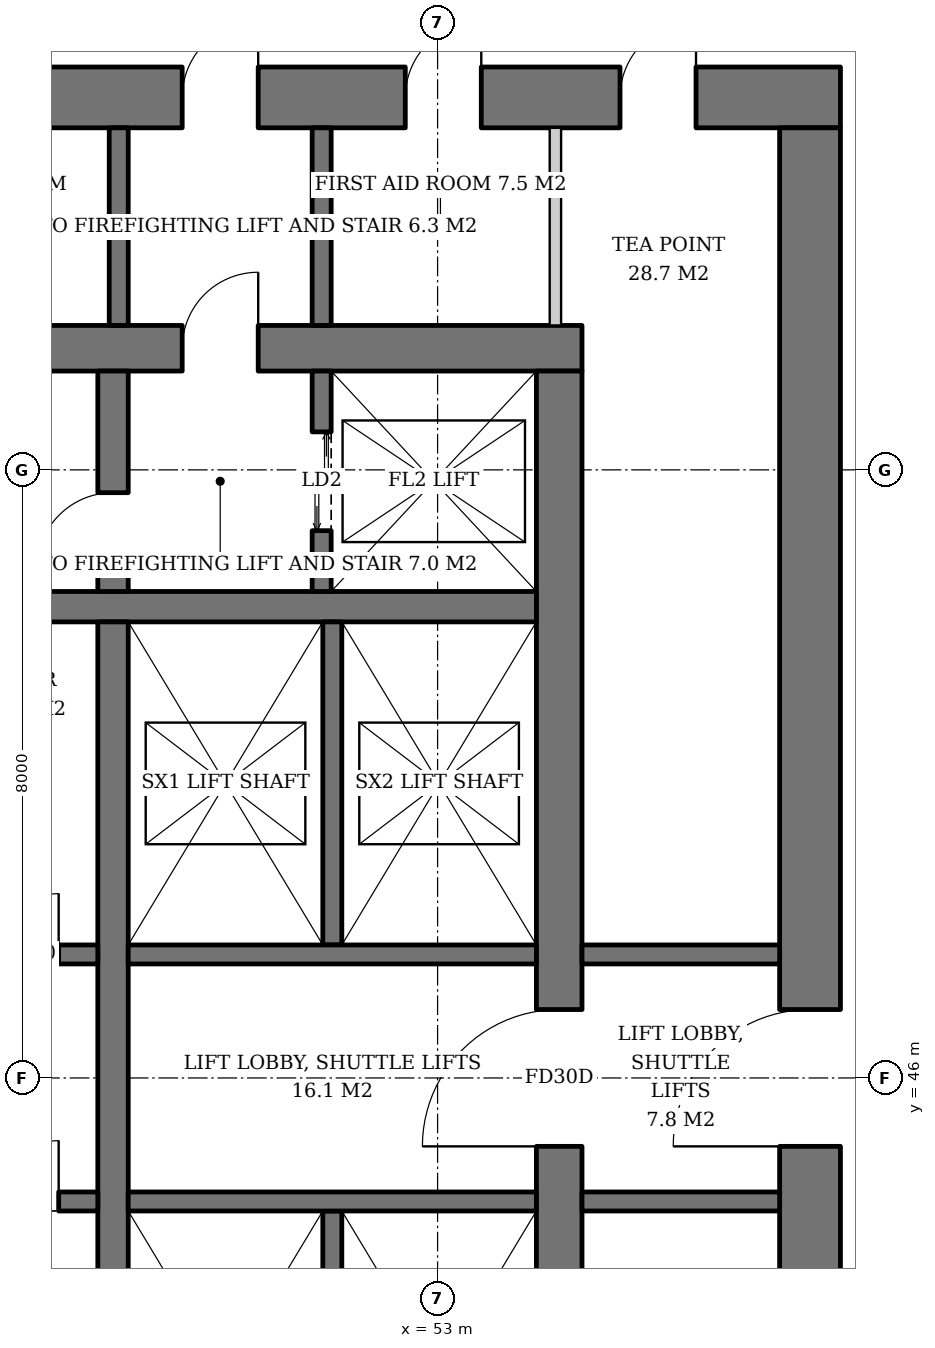
"""IFC4 building model, lengths in metres.
Left out: names, types, materials, properties, quantities, classifications, styles, units other than length and angle.
Written with IfcOpenShell. Run it as: python <this file> out.ifc"""

import sys

from ifc_helpers import new_model, si_unit, direction, frame, frame_2d, origin, place, context, subcontext, project, spatial, rectangle, extrude, element, fill, save


model = new_model("IFC4")
c1 = context("Model", 3, precision=1e-05, world=origin(), true_north=direction((0.0, 1.0)))
c2 = subcontext(c1, "Body", "Model", "MODEL_VIEW")
j1 = project(units=[si_unit("LENGTHUNIT", "METRE"), si_unit("PLANEANGLEUNIT", "RADIAN")], contexts=[c1])
p1 = place(None, origin())
s1 = spatial("IfcSite", under=j1, at=p1, CompositionType="ELEMENT")
p2 = place(p1, origin())
s2 = spatial("IfcBuilding", under=s1, at=p2, CompositionType="ELEMENT")
p3 = place(p2, frame((0.0, 0.0, 74.2)))
s3 = spatial("IfcBuildingStorey", under=s2, at=p3, CompositionType="ELEMENT", Elevation=74.2)
p4 = place(p3, frame((35.1, 55.6, 0.0), z_axis=(0.0, 0.0, 1.0), x_axis=(1.0, 0.0, 0.0)))
e1 = element("IfcWall", 1, at=p4, inside=s3, PredefinedType="SHEAR", context=c2, shape_type="SweptSolid", body=[
    extrude(rectangle(XDim=19.8, YDim=0.6, at=frame_2d((9.9, 0.0))), origin(), (0.0, 0.0, 1.0), 3.8),
])
p5 = place(p4, frame((14.54, 0.0, 0.0)))
e2 = element("IfcOpeningElement", 2, at=p5, cuts=e1, PredefinedType="OPENING", context=c2, shape_type="SweptSolid", body=[
    extrude(rectangle(XDim=1.0, YDim=2.1, at=frame_2d((0.5, 1.05))), frame((0.0, 0.31, 0.0), z_axis=(0.0, -1.0, 0.0), x_axis=(1.0, 0.0, 0.0)), (0.0, 0.0, 1.0), 0.62),
])
p6 = place(p4, frame((2.425, 0.0, 0.0)))
e3 = element("IfcOpeningElement", 3, at=p6, cuts=e1, PredefinedType="OPENING", context=c2, shape_type="SweptSolid", body=[
    extrude(rectangle(XDim=1.0, YDim=2.1, at=frame_2d((0.5, 1.05))), frame((0.0, 0.31, 0.0), z_axis=(0.0, -1.0, 0.0), x_axis=(1.0, 0.0, 0.0)), (0.0, 0.0, 1.0), 0.62),
])
p7 = place(p3, frame((54.6, 36.7, 0.0), z_axis=(0.0, 0.0, 1.0), x_axis=(0.0, 1.0, 0.0)))
e4 = element("IfcWall", 4, at=p7, inside=s3, PredefinedType="SHEAR", context=c2, shape_type="SweptSolid", body=[
    extrude(rectangle(XDim=18.6, YDim=0.6, at=frame_2d((9.3, 0.0))), origin(), (0.0, 0.0, 1.0), 3.8),
])
p8 = place(p7, frame((8.4, 0.0, 0.0)))
e5 = element("IfcOpeningElement", 5, at=p8, cuts=e4, PredefinedType="OPENING", context=c2, shape_type="SweptSolid", body=[
    extrude(rectangle(XDim=1.8, YDim=2.4, at=frame_2d((0.9, 1.2))), frame((0.0, 0.31, 0.0), z_axis=(0.0, -1.0, 0.0), x_axis=(1.0, 0.0, 0.0)), (0.0, 0.0, 1.0), 0.62),
])
p9 = place(p3, frame((31.7, 58.9, 0.0), z_axis=(0.0, 0.0, 1.0), x_axis=(1.0, 0.0, 0.0)))
e6 = element("IfcWall", 6, at=p9, inside=s3, PredefinedType="SHEAR", context=c2, shape_type="SweptSolid", body=[
    extrude(rectangle(XDim=26.6, YDim=0.8, at=frame_2d((13.3, 0.0))), origin(), (0.0, 0.0, 1.0), 3.8),
])
p10 = place(p9, frame((17.94, 0.0, 0.0)))
e7 = element("IfcOpeningElement", 7, at=p10, cuts=e6, PredefinedType="OPENING", context=c2, shape_type="SweptSolid", body=[
    extrude(rectangle(XDim=1.0, YDim=2.1, at=frame_2d((0.5, 1.05))), frame((0.0, 0.41, 0.0), z_axis=(0.0, -1.0, 0.0), x_axis=(1.0, 0.0, 0.0)), (0.0, 0.0, 1.0), 0.82),
])
p11 = place(p9, frame((5.825, 0.0, 0.0)))
e8 = element("IfcOpeningElement", 8, at=p11, cuts=e6, PredefinedType="OPENING", context=c2, shape_type="SweptSolid", body=[
    extrude(rectangle(XDim=1.0, YDim=2.1, at=frame_2d((0.5, 1.05))), frame((0.0, 0.41, 0.0), z_axis=(0.0, -1.0, 0.0), x_axis=(1.0, 0.0, 0.0)), (0.0, 0.0, 1.0), 0.82),
])
p12 = place(p9, frame((1.9, 0.0, 0.0)))
e9 = element("IfcOpeningElement", 9, at=p12, cuts=e6, PredefinedType="OPENING", context=c2, shape_type="SweptSolid", body=[
    extrude(rectangle(XDim=1.0, YDim=2.1, at=frame_2d((0.5, 1.05))), frame((0.0, 0.41, 0.0), z_axis=(0.0, -1.0, 0.0), x_axis=(1.0, 0.0, 0.0)), (0.0, 0.0, 1.0), 0.82),
])
p13 = place(p9, frame((4.134, 0.0, 0.0)))
e10 = element("IfcOpeningElement", 10, at=p13, cuts=e6, PredefinedType="OPENING", context=c2, shape_type="SweptSolid", body=[
    extrude(rectangle(XDim=1.0, YDim=2.1, at=frame_2d((0.5, 1.05))), frame((0.0, 0.41, 0.0), z_axis=(0.0, -1.0, 0.0), x_axis=(1.0, 0.0, 0.0)), (0.0, 0.0, 1.0), 0.82),
])
p14 = place(p9, frame((7.95, 0.0, 0.0)))
e11 = element("IfcOpeningElement", 11, at=p14, cuts=e6, PredefinedType="OPENING", context=c2, shape_type="SweptSolid", body=[
    extrude(rectangle(XDim=1.0, YDim=2.1, at=frame_2d((0.5, 1.05))), frame((0.0, 0.41, 0.0), z_axis=(0.0, -1.0, 0.0), x_axis=(1.0, 0.0, 0.0)), (0.0, 0.0, 1.0), 0.82),
])
p15 = place(p9, frame((11.038, 0.0, 0.0)))
e12 = element("IfcOpeningElement", 12, at=p15, cuts=e6, PredefinedType="OPENING", context=c2, shape_type="SweptSolid", body=[
    extrude(rectangle(XDim=1.0, YDim=2.1, at=frame_2d((0.5, 1.05))), frame((0.0, 0.41, 0.0), z_axis=(0.0, -1.0, 0.0), x_axis=(1.0, 0.0, 0.0)), (0.0, 0.0, 1.0), 0.82),
])
p16 = place(p9, frame((14.666, 0.0, 0.0)))
e13 = element("IfcOpeningElement", 13, at=p16, cuts=e6, PredefinedType="OPENING", context=c2, shape_type="SweptSolid", body=[
    extrude(rectangle(XDim=1.0, YDim=2.1, at=frame_2d((0.5, 1.05))), frame((0.0, 0.41, 0.0), z_axis=(0.0, -1.0, 0.0), x_axis=(1.0, 0.0, 0.0)), (0.0, 0.0, 1.0), 0.82),
])
p17 = place(p9, frame((20.875, 0.0, 0.0)))
e14 = element("IfcOpeningElement", 14, at=p17, cuts=e6, PredefinedType="OPENING", context=c2, shape_type="SweptSolid", body=[
    extrude(rectangle(XDim=1.0, YDim=2.1, at=frame_2d((0.5, 1.05))), frame((0.0, 0.41, 0.0), z_axis=(0.0, -1.0, 0.0), x_axis=(1.0, 0.0, 0.0)), (0.0, 0.0, 1.0), 0.82),
])
p18 = place(p9, frame((23.7, 0.0, 0.0)))
e15 = element("IfcOpeningElement", 15, at=p18, cuts=e6, PredefinedType="OPENING", context=c2, shape_type="SweptSolid", body=[
    extrude(rectangle(XDim=1.0, YDim=2.1, at=frame_2d((0.5, 1.05))), frame((0.0, 0.41, 0.0), z_axis=(0.0, -1.0, 0.0), x_axis=(1.0, 0.0, 0.0)), (0.0, 0.0, 1.0), 0.82),
])
p19 = place(p3, frame((57.9, 33.5, 0.0), z_axis=(0.0, 0.0, 1.0), x_axis=(0.0, 1.0, 0.0)))
e16 = element("IfcWall", 16, at=p19, inside=s3, PredefinedType="SHEAR", context=c2, shape_type="SweptSolid", body=[
    extrude(rectangle(XDim=25.0, YDim=0.8, at=frame_2d((12.5, 0.0))), origin(), (0.0, 0.0, 1.0), 3.8),
])
p20 = place(p19, frame((11.6, 0.0, 0.0)))
e17 = element("IfcOpeningElement", 17, at=p20, cuts=e16, PredefinedType="OPENING", context=c2, shape_type="SweptSolid", body=[
    extrude(rectangle(XDim=1.8, YDim=2.4, at=frame_2d((0.9, 1.2))), frame((0.0, 0.41, 0.0), z_axis=(0.0, -1.0, 0.0), x_axis=(1.0, 0.0, 0.0)), (0.0, 0.0, 1.0), 0.82),
])
p21 = place(p3, frame((35.7, 52.2, 0.0), z_axis=(0.0, 0.0, 1.0), x_axis=(1.0, 0.0, 0.0)))
e18 = element("IfcWall", 18, at=p21, inside=s3, PredefinedType="SHEAR", context=c2, shape_type="SweptSolid", body=[
    extrude(rectangle(XDim=18.6, YDim=0.4, at=frame_2d((9.3, 0.0))), origin(), (0.0, 0.0, 1.0), 3.8),
])
p22 = place(p3, frame((48.73, 40.0, 0.0), z_axis=(0.0, 0.0, 1.0), x_axis=(0.0, 1.0, 0.0)))
e19 = element("IfcWall", 19, at=p22, inside=s3, PredefinedType="SHEAR", context=c2, shape_type="SweptSolid", body=[
    extrude(rectangle(XDim=12.0, YDim=0.4, at=frame_2d((6.0, 0.0))), origin(), (0.0, 0.0, 1.0), 3.8),
])
p23 = place(p3, frame((48.73, 52.4, 0.0), z_axis=(0.0, 0.0, 1.0), x_axis=(0.0, 1.0, 0.0)))
e20 = element("IfcWall", 20, at=p23, inside=s3, PredefinedType="SHEAR", context=c2, shape_type="SweptSolid", body=[
    extrude(rectangle(XDim=2.9, YDim=0.4, at=frame_2d((1.45, 0.0))), origin(), (0.0, 0.0, 1.0), 3.8),
])
p24 = place(p23, frame((0.3, 0.0, 0.0)))
e21 = element("IfcOpeningElement", 21, at=p24, cuts=e20, PredefinedType="OPENING", context=c2, shape_type="SweptSolid", body=[
    extrude(rectangle(XDim=1.0, YDim=2.1, at=frame_2d((0.5, 1.05))), frame((0.0, 0.21, 0.0), z_axis=(0.0, -1.0, 0.0), x_axis=(1.0, 0.0, 0.0)), (0.0, 0.0, 1.0), 0.42),
])
p25 = place(p3, frame((51.475, 52.4, 0.0), z_axis=(0.0, 0.0, 1.0), x_axis=(0.0, 1.0, 0.0)))
e22 = element("IfcWall", 22, at=p25, inside=s3, PredefinedType="SHEAR", context=c2, shape_type="SweptSolid", body=[
    extrude(rectangle(XDim=2.9, YDim=0.25, at=frame_2d((1.45, 0.0))), origin(), (0.0, 0.0, 1.0), 3.8),
])
p26 = place(p25, frame((0.8, 0.0, 0.0)))
e23 = element("IfcOpeningElement", 23, at=p26, cuts=e22, PredefinedType="OPENING", context=c2, shape_type="SweptSolid", body=[
    extrude(rectangle(XDim=1.3, YDim=2.2, at=frame_2d((0.65, 1.1))), frame((0.0, 0.135, 0.0), z_axis=(0.0, -1.0, 0.0), x_axis=(1.0, 0.0, 0.0)), (0.0, 0.0, 1.0), 0.27),
])
p27 = place(p3, frame((35.7, 47.625, 0.0), z_axis=(0.0, 0.0, 1.0), x_axis=(1.0, 0.0, 0.0)))
e24 = element("IfcWall", 24, at=p27, inside=s3, PredefinedType="SHEAR", context=c2, shape_type="SweptSolid", body=[
    extrude(rectangle(XDim=12.83, YDim=0.25, at=frame_2d((6.415, 0.0))), origin(), (0.0, 0.0, 1.0), 3.8),
])
p28 = place(p27, frame((0.7, 0.0, 0.0)))
e25 = element("IfcOpeningElement", 25, at=p28, cuts=e24, PredefinedType="OPENING", context=c2, shape_type="SweptSolid", body=[
    extrude(rectangle(XDim=1.1, YDim=2.2, at=frame_2d((0.55, 1.1))), frame((0.0, 0.135, 0.0), z_axis=(0.0, -1.0, 0.0), x_axis=(1.0, 0.0, 0.0)), (0.0, 0.0, 1.0), 0.27),
])
p29 = place(p27, frame((3.45, 0.0, 0.0)))
e26 = element("IfcOpeningElement", 26, at=p29, cuts=e24, PredefinedType="OPENING", context=c2, shape_type="SweptSolid", body=[
    extrude(rectangle(XDim=1.1, YDim=2.2, at=frame_2d((0.55, 1.1))), frame((0.0, 0.135, 0.0), z_axis=(0.0, -1.0, 0.0), x_axis=(1.0, 0.0, 0.0)), (0.0, 0.0, 1.0), 0.27),
])
p30 = place(p27, frame((6.2, 0.0, 0.0)))
e27 = element("IfcOpeningElement", 27, at=p30, cuts=e24, PredefinedType="OPENING", context=c2, shape_type="SweptSolid", body=[
    extrude(rectangle(XDim=1.1, YDim=2.2, at=frame_2d((0.55, 1.1))), frame((0.0, 0.135, 0.0), z_axis=(0.0, -1.0, 0.0), x_axis=(1.0, 0.0, 0.0)), (0.0, 0.0, 1.0), 0.27),
])
p31 = place(p27, frame((8.95, 0.0, 0.0)))
e28 = element("IfcOpeningElement", 28, at=p31, cuts=e24, PredefinedType="OPENING", context=c2, shape_type="SweptSolid", body=[
    extrude(rectangle(XDim=1.1, YDim=2.2, at=frame_2d((0.55, 1.1))), frame((0.0, 0.135, 0.0), z_axis=(0.0, -1.0, 0.0), x_axis=(1.0, 0.0, 0.0)), (0.0, 0.0, 1.0), 0.27),
])
p32 = place(p27, frame((11.515, 0.0, 0.0)))
e29 = element("IfcOpeningElement", 29, at=p32, cuts=e24, PredefinedType="OPENING", context=c2, shape_type="SweptSolid", body=[
    extrude(rectangle(XDim=0.8, YDim=2.0, at=frame_2d((0.4, 1.0))), frame((0.0, 0.135, 0.0), z_axis=(0.0, -1.0, 0.0), x_axis=(1.0, 0.0, 0.0)), (0.0, 0.0, 1.0), 0.27),
])
p33 = place(p3, frame((35.7, 44.375, 0.0), z_axis=(0.0, 0.0, 1.0), x_axis=(1.0, 0.0, 0.0)))
e30 = element("IfcWall", 30, at=p33, inside=s3, PredefinedType="SHEAR", context=c2, shape_type="SweptSolid", body=[
    extrude(rectangle(XDim=12.83, YDim=0.25, at=frame_2d((6.415, 0.0))), origin(), (0.0, 0.0, 1.0), 3.8),
])
p34 = place(p33, frame((0.7, 0.0, 0.0)))
e31 = element("IfcOpeningElement", 31, at=p34, cuts=e30, PredefinedType="OPENING", context=c2, shape_type="SweptSolid", body=[
    extrude(rectangle(XDim=1.1, YDim=2.2, at=frame_2d((0.55, 1.1))), frame((0.0, 0.135, 0.0), z_axis=(0.0, -1.0, 0.0), x_axis=(1.0, 0.0, 0.0)), (0.0, 0.0, 1.0), 0.27),
])
p35 = place(p33, frame((3.45, 0.0, 0.0)))
e32 = element("IfcOpeningElement", 32, at=p35, cuts=e30, PredefinedType="OPENING", context=c2, shape_type="SweptSolid", body=[
    extrude(rectangle(XDim=1.1, YDim=2.2, at=frame_2d((0.55, 1.1))), frame((0.0, 0.135, 0.0), z_axis=(0.0, -1.0, 0.0), x_axis=(1.0, 0.0, 0.0)), (0.0, 0.0, 1.0), 0.27),
])
p36 = place(p33, frame((6.2, 0.0, 0.0)))
e33 = element("IfcOpeningElement", 33, at=p36, cuts=e30, PredefinedType="OPENING", context=c2, shape_type="SweptSolid", body=[
    extrude(rectangle(XDim=1.1, YDim=2.2, at=frame_2d((0.55, 1.1))), frame((0.0, 0.135, 0.0), z_axis=(0.0, -1.0, 0.0), x_axis=(1.0, 0.0, 0.0)), (0.0, 0.0, 1.0), 0.27),
])
p37 = place(p33, frame((8.95, 0.0, 0.0)))
e34 = element("IfcOpeningElement", 34, at=p37, cuts=e30, PredefinedType="OPENING", context=c2, shape_type="SweptSolid", body=[
    extrude(rectangle(XDim=1.1, YDim=2.2, at=frame_2d((0.55, 1.1))), frame((0.0, 0.135, 0.0), z_axis=(0.0, -1.0, 0.0), x_axis=(1.0, 0.0, 0.0)), (0.0, 0.0, 1.0), 0.27),
])
p38 = place(p33, frame((11.515, 0.0, 0.0)))
e35 = element("IfcOpeningElement", 35, at=p38, cuts=e30, PredefinedType="OPENING", context=c2, shape_type="SweptSolid", body=[
    extrude(rectangle(XDim=0.8, YDim=2.0, at=frame_2d((0.4, 1.0))), frame((0.0, 0.135, 0.0), z_axis=(0.0, -1.0, 0.0), x_axis=(1.0, 0.0, 0.0)), (0.0, 0.0, 1.0), 0.27),
])
p39 = place(p3, frame((51.615, 47.75, 0.0), z_axis=(0.0, 0.0, 1.0), x_axis=(0.0, 1.0, 0.0)))
e36 = element("IfcWall", 36, at=p39, inside=s3, PredefinedType="SHEAR", context=c2, shape_type="SweptSolid", body=[
    extrude(rectangle(XDim=4.25, YDim=0.25, at=frame_2d((2.125, 0.0))), origin(), (0.0, 0.0, 1.0), 3.8),
])
p40 = place(p3, frame((48.93, 47.625, 0.0), z_axis=(0.0, 0.0, 1.0), x_axis=(1.0, 0.0, 0.0)))
e37 = element("IfcWall", 37, at=p40, inside=s3, PredefinedType="SHEAR", context=c2, shape_type="SweptSolid", body=[
    extrude(rectangle(XDim=5.37, YDim=0.25, at=frame_2d((2.685, 0.0))), origin(), (0.0, 0.0, 1.0), 3.8),
])
p41 = place(p3, frame((51.615, 44.25, 0.0), z_axis=(0.0, 0.0, 1.0), x_axis=(0.0, -1.0, 0.0)))
e38 = element("IfcWall", 38, at=p41, inside=s3, PredefinedType="SHEAR", context=c2, shape_type="SweptSolid", body=[
    extrude(rectangle(XDim=4.25, YDim=0.25, at=frame_2d((2.125, 0.0))), origin(), (0.0, 0.0, 1.0), 3.8),
])
p42 = place(p3, frame((48.93, 44.375, 0.0), z_axis=(0.0, 0.0, 1.0), x_axis=(1.0, 0.0, 0.0)))
e39 = element("IfcWall", 39, at=p42, inside=s3, PredefinedType="SHEAR", context=c2, shape_type="SweptSolid", body=[
    extrude(rectangle(XDim=5.37, YDim=0.25, at=frame_2d((2.685, 0.0))), origin(), (0.0, 0.0, 1.0), 3.8),
])
for number, where, z_axis, x_axis in (
    (40, (48.805, 55.9, 0.0), (0.0, 0.0, 1.0), (0.0, 1.0, 0.0)),
    (41, (51.475, 55.9, 0.0), (0.0, 0.0, 1.0), (0.0, 1.0, 0.0)),
    (42, (54.9, 44.375, 0.0), (0.0, 0.0, 1.0), (1.0, 0.0, 0.0)),
    (43, (54.9, 47.625, 0.0), (0.0, 0.0, 1.0), (1.0, 0.0, 0.0)),
):
    element("IfcWall", number, at=place(p3, frame(where, z_axis=z_axis, x_axis=x_axis)), inside=s3, PredefinedType="SOLIDWALL", context=c2, shape_type="SweptSolid", body=[
        extrude(rectangle(XDim=2.6, YDim=0.25, at=frame_2d((1.3, 0.0))), origin(), (0.0, 0.0, 1.0), 3.62),
    ])
p43 = place(p3, frame((54.55, 55.9, 0.0), z_axis=(0.0, 0.0, 1.0), x_axis=(0.0, 1.0, 0.0)))
e44 = element("IfcWall", 44, at=p43, inside=s3, PredefinedType="SOLIDWALL", context=c2, shape_type="SweptSolid", body=[
    extrude(rectangle(XDim=2.6, YDim=0.15, at=frame_2d((1.3, 0.0))), origin(), (0.0, 0.0, 1.0), 3.62),
])
p44 = place(p26, origin())
e45 = element("IfcDoor", 45, at=p44, inside=s3, OperationType="DOUBLE_DOOR_SLIDING", PredefinedType="DOOR", context=c2, shape_type="SweptSolid", body=[
    extrude(rectangle(XDim=1.3, YDim=2.2, at=frame_2d((0.65, 1.1))), frame((0.0, 0.025, 0.0), z_axis=(0.0, -1.0, 0.0), x_axis=(1.0, 0.0, 0.0)), (0.0, 0.0, 1.0), 0.05),
])
fill(e23, e45)
p45 = place(p32, origin())
e46 = element("IfcDoor", 46, at=p45, inside=s3, OperationType="SINGLE_SWING_RIGHT", PredefinedType="DOOR", context=c2, shape_type="SweptSolid", body=[
    extrude(rectangle(XDim=0.8, YDim=2.0, at=frame_2d((0.4, 1.0))), frame((0.0, 0.025, 0.0), z_axis=(0.0, -1.0, 0.0), x_axis=(1.0, 0.0, 0.0)), (0.0, 0.0, 1.0), 0.05),
])
fill(e29, e46)
p46 = place(p38, origin())
e47 = element("IfcDoor", 47, at=p46, inside=s3, OperationType="SINGLE_SWING_RIGHT", PredefinedType="DOOR", context=c2, shape_type="SweptSolid", body=[
    extrude(rectangle(XDim=0.8, YDim=2.0, at=frame_2d((0.4, 1.0))), frame((0.0, 0.025, 0.0), z_axis=(0.0, -1.0, 0.0), x_axis=(1.0, 0.0, 0.0)), (0.0, 0.0, 1.0), 0.05),
])
fill(e35, e47)
p47 = place(p24, origin())
e48 = element("IfcDoor", 48, at=p47, inside=s3, OperationType="SINGLE_SWING_LEFT", PredefinedType="DOOR", context=c2, shape_type="SweptSolid", body=[
    extrude(rectangle(XDim=1.0, YDim=2.1, at=frame_2d((0.5, 1.05))), frame((0.0, 0.025, 0.0), z_axis=(0.0, -1.0, 0.0), x_axis=(1.0, 0.0, 0.0)), (0.0, 0.0, 1.0), 0.05),
])
fill(e21, e48)
p48 = place(p5, origin())
e49 = element("IfcDoor", 49, at=p48, inside=s3, OperationType="SINGLE_SWING_RIGHT", PredefinedType="DOOR", context=c2, shape_type="SweptSolid", body=[
    extrude(rectangle(XDim=1.0, YDim=2.1, at=frame_2d((0.5, 1.05))), frame((0.0, 0.025, 0.0), z_axis=(0.0, -1.0, 0.0), x_axis=(1.0, 0.0, 0.0)), (0.0, 0.0, 1.0), 0.05),
])
fill(e2, e49)
p49 = place(p8, origin())
e50 = element("IfcDoor", 50, at=p49, inside=s3, OperationType="DOUBLE_DOOR_SINGLE_SWING", PredefinedType="DOOR", context=c2, shape_type="SweptSolid", body=[
    extrude(rectangle(XDim=1.8, YDim=2.4, at=frame_2d((0.9, 1.2))), frame((0.0, 0.025, 0.0), z_axis=(0.0, -1.0, 0.0), x_axis=(1.0, 0.0, 0.0)), (0.0, 0.0, 1.0), 0.05),
])
fill(e5, e50)
p50 = place(p20, origin())
e51 = element("IfcDoor", 51, at=p50, inside=s3, OperationType="DOUBLE_DOOR_SINGLE_SWING", PredefinedType="DOOR", context=c2, shape_type="SweptSolid", body=[
    extrude(rectangle(XDim=1.8, YDim=2.4, at=frame_2d((0.9, 1.2))), frame((0.0, 0.025, 0.0), z_axis=(0.0, -1.0, 0.0), x_axis=(1.0, 0.0, 0.0)), (0.0, 0.0, 1.0), 0.05),
])
fill(e17, e51)
p51 = place(p10, origin())
e52 = element("IfcDoor", 52, at=p51, inside=s3, OperationType="SINGLE_SWING_RIGHT", PredefinedType="DOOR", context=c2, shape_type="SweptSolid", body=[
    extrude(rectangle(XDim=1.0, YDim=2.1, at=frame_2d((0.5, 1.05))), frame((0.0, 0.025, 0.0), z_axis=(0.0, -1.0, 0.0), x_axis=(1.0, 0.0, 0.0)), (0.0, 0.0, 1.0), 0.05),
])
fill(e7, e52)
p52 = place(p17, origin())
e53 = element("IfcDoor", 53, at=p52, inside=s3, OperationType="SINGLE_SWING_RIGHT", PredefinedType="DOOR", context=c2, shape_type="SweptSolid", body=[
    extrude(rectangle(XDim=1.0, YDim=2.1, at=frame_2d((0.5, 1.05))), frame((0.0, -0.34, 0.0), z_axis=(0.0, -1.0, 0.0), x_axis=(1.0, 0.0, 0.0)), (0.0, 0.0, 1.0), 0.05),
])
fill(e14, e53)
p53 = place(p18, origin())
e54 = element("IfcDoor", 54, at=p53, inside=s3, OperationType="SINGLE_SWING_RIGHT", PredefinedType="DOOR", context=c2, shape_type="SweptSolid", body=[
    extrude(rectangle(XDim=1.0, YDim=2.1, at=frame_2d((0.5, 1.05))), frame((0.0, -0.34, 0.0), z_axis=(0.0, -1.0, 0.0), x_axis=(1.0, 0.0, 0.0)), (0.0, 0.0, 1.0), 0.05),
])
fill(e15, e54)
save(model, sys.argv[1])
